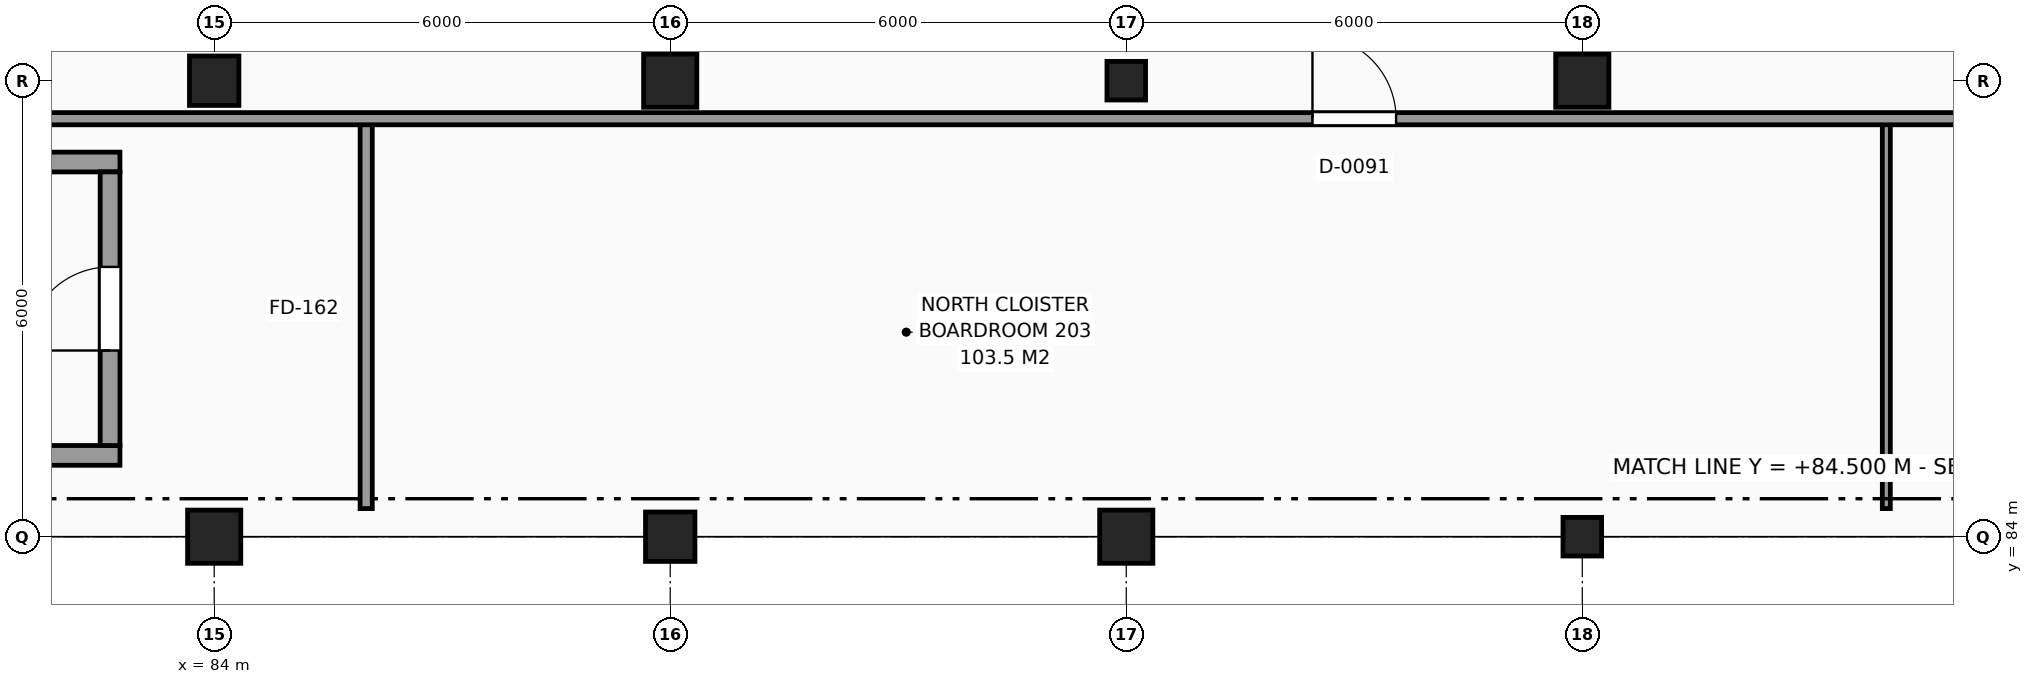
"""IFC4 building model, lengths in metres.
Left out: names, types, materials, properties, quantities, classifications, styles, units other than length and angle.
Written with IfcOpenShell. Run it as: python <this file> out.ifc"""

import sys

from ifc_helpers import new_model, si_unit, direction, frame, frame_2d, origin, origin_2d, place, context, subcontext, project, spatial, rectangle, circle, hollow_circle, extrude, element, fill, save


model = new_model("IFC4")
c1 = context("Model", 3, precision=1e-05, world=origin(), true_north=direction((0.0, 1.0)))
c2 = subcontext(c1, "Body", "Model", "MODEL_VIEW")
j1 = project(units=[si_unit("LENGTHUNIT", "METRE"), si_unit("PLANEANGLEUNIT", "RADIAN")], contexts=[c1])
p1 = place(None, origin())
s1 = spatial("IfcSite", under=j1, at=p1, CompositionType="ELEMENT")
p2 = place(p1, origin())
s2 = spatial("IfcBuilding", under=s1, at=p2, CompositionType="ELEMENT")
p3 = place(p2, frame((0.0, 0.0, 10.5)))
s3 = spatial("IfcBuildingStorey", under=s2, at=p3, CompositionType="ELEMENT", Elevation=10.5)
p4 = place(p3, frame((84.0, 84.0, 0.0), z_axis=(0.0, 0.0, 1.0), x_axis=(1.0, 0.0, 0.0)))
e1 = element("IfcColumn", 1, at=p4, inside=s3, PredefinedType="COLUMN", context=c2, shape_type="SweptSolid", body=[
    extrude(rectangle(XDim=0.7, YDim=0.7, at=origin_2d()), origin(), (0.0, 0.0, 1.0), 4.5),
])
for number, where, z_axis, x_axis in (
    (2, (84.0, 90.0, 0.0), (0.0, 0.0, 1.0), (1.0, 0.0, 0.0)),
    (3, (90.0, 84.0, 0.0), (0.0, 0.0, 1.0), (1.0, 0.0, 0.0)),
):
    element("IfcColumn", number, at=place(p3, frame(where, z_axis=z_axis, x_axis=x_axis)), inside=s3, PredefinedType="COLUMN", context=c2, shape_type="SweptSolid", body=[
        extrude(rectangle(XDim=0.65, YDim=0.65, at=origin_2d()), origin(), (0.0, 0.0, 1.0), 4.5),
    ])
for number, where, z_axis, x_axis in (
    (4, (90.0, 90.0, 0.0), (0.0, 0.0, 1.0), (1.0, 0.0, 0.0)),
    (5, (96.0, 84.0, 0.0), (0.0, 0.0, 1.0), (1.0, 0.0, 0.0)),
):
    element("IfcColumn", number, at=place(p3, frame(where, z_axis=z_axis, x_axis=x_axis)), inside=s3, PredefinedType="COLUMN", context=c2, shape_type="SweptSolid", body=[
        extrude(circle(Radius=0.35, at=origin_2d()), origin(), (0.0, 0.0, 1.0), 4.5),
    ])
for number, where, z_axis, x_axis in (
    (6, (96.0, 90.0, 0.0), (0.0, 0.0, 1.0), (1.0, 0.0, 0.0)),
    (7, (102.0, 84.0, 0.0), (0.0, 0.0, 1.0), (1.0, 0.0, 0.0)),
):
    element("IfcColumn", number, at=place(p3, frame(where, z_axis=z_axis, x_axis=x_axis)), inside=s3, PredefinedType="COLUMN", context=c2, shape_type="SweptSolid", body=[
        extrude(hollow_circle(Radius=0.254, WallThickness=0.025, at=origin_2d()), origin(), (0.0, 0.0, 1.0), 4.5),
    ])
p5 = place(p3, frame((102.0, 90.0, 0.0), z_axis=(0.0, 0.0, 1.0), x_axis=(1.0, 0.0, 0.0)))
e8 = element("IfcColumn", 8, at=p5, inside=s3, PredefinedType="COLUMN", context=c2, shape_type="SweptSolid", body=[
    extrude(rectangle(XDim=0.7, YDim=0.7, at=origin_2d()), origin(), (0.0, 0.0, 1.0), 4.5),
])
for number, where, z_axis, x_axis in (
    (9, (72.04, 85.07, 0.0), (0.0, 0.0, 1.0), (1.0, 0.0, 0.0)),
    (10, (72.04, 88.93, 0.0), (0.0, 0.0, 1.0), (1.0, 0.0, 0.0)),
):
    element("IfcWall", number, at=place(p3, frame(where, z_axis=z_axis, x_axis=x_axis)), inside=s3, PredefinedType="SHEAR", context=c2, shape_type="SweptSolid", body=[
        extrude(rectangle(XDim=10.72, YDim=0.26, at=frame_2d((5.36, 0.0))), origin(), (0.0, 0.0, 1.0), 4.5),
    ])
p6 = place(p3, frame((82.63, 85.2, 0.0), z_axis=(0.0, 0.0, 1.0), x_axis=(0.0, 1.0, 0.0)))
e11 = element("IfcWall", 11, at=p6, inside=s3, PredefinedType="SHEAR", context=c2, shape_type="SweptSolid", body=[
    extrude(rectangle(XDim=3.6, YDim=0.26, at=frame_2d((1.8, 0.0))), origin(), (0.0, 0.0, 1.0), 4.5),
])
p7 = place(p6, frame((1.25, 0.0, 0.0)))
e12 = element("IfcOpeningElement", 12, at=p7, cuts=e11, PredefinedType="OPENING", context=c2, shape_type="SweptSolid", body=[
    extrude(rectangle(XDim=1.1, YDim=2.15, at=frame_2d((0.55, 1.075))), frame((0.0, 0.14, 0.0), z_axis=(0.0, -1.0, 0.0), x_axis=(1.0, 0.0, 0.0)), (0.0, 0.0, 1.0), 0.28),
])
p8 = place(p3, frame((86.0, 84.37, 0.0), z_axis=(0.0, 0.0, 1.0), x_axis=(0.0, 1.0, 0.0)))
e13 = element("IfcWall", 13, at=p8, inside=s3, PredefinedType="PARTITIONING", context=c2, shape_type="SweptSolid", body=[
    extrude(rectangle(XDim=5.13, YDim=0.16, at=frame_2d((2.565, 0.0))), origin(), (0.0, 0.0, 1.0), 4.24),
])
p9 = place(p3, frame((106.0, 84.37, 0.0), z_axis=(0.0, 0.0, 1.0), x_axis=(0.0, 1.0, 0.0)))
e14 = element("IfcWall", 14, at=p9, inside=s3, PredefinedType="PARTITIONING", context=c2, shape_type="SweptSolid", body=[
    extrude(rectangle(XDim=5.13, YDim=0.105, at=frame_2d((2.565, 0.0))), origin(), (0.0, 0.0, 1.0), 4.24),
])
p10 = place(p3, frame((60.18, 89.5, 0.0), z_axis=(0.0, 0.0, 1.0), x_axis=(1.0, 0.0, 0.0)))
e15 = element("IfcWall", 15, at=p10, inside=s3, PredefinedType="PARTITIONING", context=c2, shape_type="SweptSolid", body=[
    extrude(rectangle(XDim=65.775, YDim=0.16, at=frame_2d((32.888, 0.0))), origin(), (0.0, 0.0, 1.0), 4.24),
])
p11 = place(p10, frame((38.27, 0.0, 0.0)))
e16 = element("IfcOpeningElement", 16, at=p11, cuts=e15, PredefinedType="OPENING", context=c2, shape_type="SweptSolid", body=[
    extrude(rectangle(XDim=1.1, YDim=2.15, at=frame_2d((0.55, 1.075))), frame((0.0, 0.09, 0.0), z_axis=(0.0, -1.0, 0.0), x_axis=(1.0, 0.0, 0.0)), (0.0, 0.0, 1.0), 0.18),
])
p12 = place(p10, frame((56.27, 0.0, 0.0)))
e17 = element("IfcOpeningElement", 17, at=p12, cuts=e15, PredefinedType="OPENING", context=c2, shape_type="SweptSolid", body=[
    extrude(rectangle(XDim=1.1, YDim=2.15, at=frame_2d((0.55, 1.075))), frame((0.0, 0.09, 0.0), z_axis=(0.0, -1.0, 0.0), x_axis=(1.0, 0.0, 0.0)), (0.0, 0.0, 1.0), 0.18),
])
p13 = place(p10, frame((2.27, 0.0, 0.0)))
e18 = element("IfcOpeningElement", 18, at=p13, cuts=e15, PredefinedType="OPENING", context=c2, shape_type="SweptSolid", body=[
    extrude(rectangle(XDim=1.1, YDim=2.15, at=frame_2d((0.55, 1.075))), frame((0.0, 0.09, 0.0), z_axis=(0.0, -1.0, 0.0), x_axis=(1.0, 0.0, 0.0)), (0.0, 0.0, 1.0), 0.18),
])
p14 = place(p7, origin())
e19 = element("IfcDoor", 19, at=p14, inside=s3, OperationType="SINGLE_SWING_LEFT", PredefinedType="DOOR", context=c2, shape_type="SweptSolid", body=[
    extrude(rectangle(XDim=1.1, YDim=2.15, at=frame_2d((0.55, 1.075))), frame((0.0, 0.025, 0.0), z_axis=(0.0, -1.0, 0.0), x_axis=(1.0, 0.0, 0.0)), (0.0, 0.0, 1.0), 0.05),
])
fill(e12, e19)
p15 = place(p11, origin())
e20 = element("IfcDoor", 20, at=p15, inside=s3, OperationType="SINGLE_SWING_LEFT", PredefinedType="DOOR", context=c2, shape_type="SweptSolid", body=[
    extrude(rectangle(XDim=1.1, YDim=2.15, at=frame_2d((0.55, 1.075))), frame((0.0, 0.025, 0.0), z_axis=(0.0, -1.0, 0.0), x_axis=(1.0, 0.0, 0.0)), (0.0, 0.0, 1.0), 0.05),
])
fill(e16, e20)
save(model, sys.argv[1])
